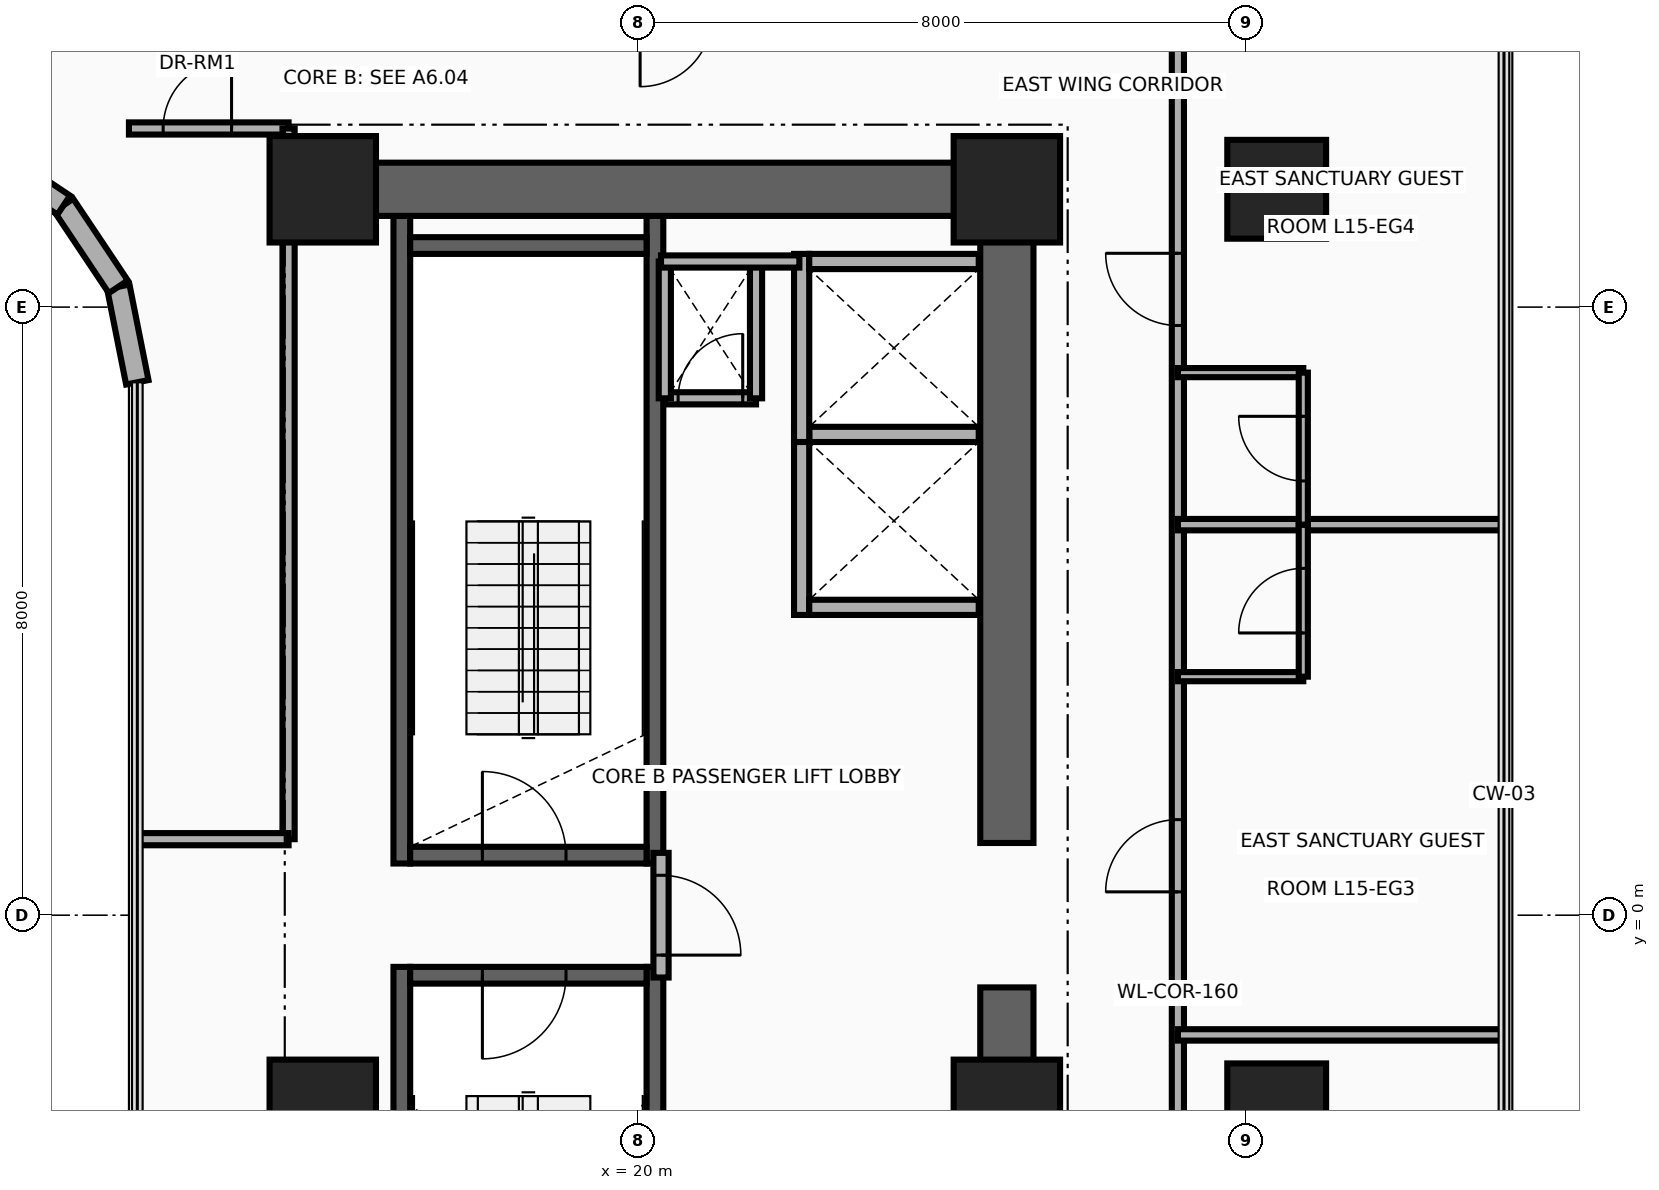
"""IFC4 building model, lengths in metres.
Left out: names, types, materials, properties, quantities, classifications, styles, units other than length and angle.
Written with IfcOpenShell. Run it as: python <this file> out.ifc"""

import sys

from ifc_helpers import new_model, si_unit, direction, frame, frame_2d, origin, origin_2d, place, context, subcontext, project, spatial, rectangle, circle, extrude, source, transform, mapped, element, fill, save


model = new_model("IFC4")
c1 = context("Model", 3, precision=1e-05, world=origin(), true_north=direction((0.0, 1.0)))
c2 = subcontext(c1, "Body", "Model", "MODEL_VIEW")
j1 = project(units=[si_unit("LENGTHUNIT", "METRE"), si_unit("PLANEANGLEUNIT", "RADIAN")], contexts=[c1])
p1 = place(None, origin())
s1 = spatial("IfcSite", under=j1, at=p1, CompositionType="ELEMENT")
p2 = place(p1, origin())
s2 = spatial("IfcBuilding", under=s1, at=p2, CompositionType="ELEMENT")
p3 = place(p2, frame((0.0, 0.0, 63.0)))
s3 = spatial("IfcBuildingStorey", under=s2, at=p3, CompositionType="ELEMENT", Elevation=63.0)
for number, where, z_axis, x_axis in (
    (1, (16.89, 0.68, 0.0), (0.0, 0.0, 1.0), (0.0, 1.0, 0.0)),
    (2, (20.22, 0.68, 0.0), (0.0, 0.0, 1.0), (0.0, 1.0, 0.0)),
):
    element("IfcWall", number, at=place(p3, frame(where, z_axis=z_axis, x_axis=x_axis)), inside=s3, PredefinedType="SHEAR", context=c2, shape_type="SweptSolid", body=[
        extrude(rectangle(XDim=8.52, YDim=0.22, at=frame_2d((4.26, 0.0))), origin(), (0.0, 0.0, 1.0), 3.46),
    ])
p4 = place(p3, frame((17.0, 0.79, 0.0), z_axis=(0.0, 0.0, 1.0), x_axis=(1.0, 0.0, 0.0)))
e3 = element("IfcWall", 3, at=p4, inside=s3, PredefinedType="SHEAR", context=c2, shape_type="SweptSolid", body=[
    extrude(rectangle(XDim=3.11, YDim=0.22, at=frame_2d((1.555, 0.0))), origin(), (0.0, 0.0, 1.0), 3.46),
])
p5 = place(p4, frame((0.95, 0.0, 0.0)))
e4 = element("IfcOpeningElement", 4, at=p5, cuts=e3, PredefinedType="OPENING", context=c2, shape_type="SweptSolid", body=[
    extrude(rectangle(XDim=1.1, YDim=2.15, at=frame_2d((0.55, 1.075))), frame((0.0, 0.125, 0.0), z_axis=(0.0, -1.0, 0.0), x_axis=(1.0, 0.0, 0.0)), (0.0, 0.0, 1.0), 0.25),
])
p6 = place(p3, frame((17.0, 8.81, 0.0), z_axis=(0.0, 0.0, 1.0), x_axis=(1.0, 0.0, 0.0)))
e5 = element("IfcWall", 5, at=p6, inside=s3, PredefinedType="SHEAR", context=c2, shape_type="SweptSolid", body=[
    extrude(rectangle(XDim=3.11, YDim=0.22, at=frame_2d((1.555, 0.0))), origin(), (0.0, 0.0, 1.0), 3.46),
])
for number, where, z_axis, x_axis in (
    (6, (16.89, -9.2, 0.0), (0.0, 0.0, 1.0), (0.0, 1.0, 0.0)),
    (7, (20.22, -9.2, 0.0), (0.0, 0.0, 1.0), (0.0, 1.0, 0.0)),
):
    element("IfcWall", number, at=place(p3, frame(where, z_axis=z_axis, x_axis=x_axis)), inside=s3, PredefinedType="SHEAR", context=c2, shape_type="SweptSolid", body=[
        extrude(rectangle(XDim=8.52, YDim=0.22, at=frame_2d((4.26, 0.0))), origin(), (0.0, 0.0, 1.0), 3.46),
    ])
p7 = place(p3, frame((17.0, -0.79, 0.0), z_axis=(0.0, 0.0, 1.0), x_axis=(1.0, 0.0, 0.0)))
e8 = element("IfcWall", 8, at=p7, inside=s3, PredefinedType="SHEAR", context=c2, shape_type="SweptSolid", body=[
    extrude(rectangle(XDim=3.11, YDim=0.22, at=frame_2d((1.555, 0.0))), origin(), (0.0, 0.0, 1.0), 3.46),
])
p8 = place(p7, frame((0.95, 0.0, 0.0)))
e9 = element("IfcOpeningElement", 9, at=p8, cuts=e8, PredefinedType="OPENING", context=c2, shape_type="SweptSolid", body=[
    extrude(rectangle(XDim=1.1, YDim=2.15, at=frame_2d((0.55, 1.075))), frame((0.0, 0.125, 0.0), z_axis=(0.0, -1.0, 0.0), x_axis=(1.0, 0.0, 0.0)), (0.0, 0.0, 1.0), 0.25),
])
for number, where, z_axis, x_axis in (
    (10, (24.85, -9.9, 0.0), (0.0, 0.0, 1.0), (0.0, 1.0, 0.0)),
    (11, (24.85, 0.95, 0.0), (0.0, 0.0, 1.0), (0.0, 1.0, 0.0)),
):
    element("IfcWall", number, at=place(p3, frame(where, z_axis=z_axis, x_axis=x_axis)), inside=s3, PredefinedType="SHEAR", context=c2, shape_type="SweptSolid", body=[
        extrude(rectangle(XDim=8.95, YDim=0.7, at=frame_2d((4.475, 0.0))), origin(), (0.0, 0.0, 1.0), 3.46),
    ])
p9 = place(p3, frame((15.85, 9.55, 0.0), z_axis=(0.0, 0.0, 1.0), x_axis=(1.0, 0.0, 0.0)))
e12 = element("IfcWall", 12, at=p9, inside=s3, PredefinedType="SHEAR", context=c2, shape_type="SweptSolid", body=[
    extrude(rectangle(XDim=9.0, YDim=0.7, at=frame_2d((4.5, 0.0))), origin(), (0.0, 0.0, 1.0), 3.46),
])
m1 = source(origin(), c2, "Body", "SweptSolid", [
    extrude(rectangle(XDim=1.4, YDim=1.4, at=origin_2d()), origin(), (0.0, 0.0, 1.0), 3.7),
])
for number, where, z_axis, x_axis in (
    (13, (15.85, -2.6, 0.0), (0.0, 0.0, 1.0), (1.0, 0.0, 0.0)),
    (14, (24.85, -2.6, 0.0), (0.0, 0.0, 1.0), (1.0, 0.0, 0.0)),
):
    element("IfcColumn", number, at=place(p3, frame(where, z_axis=z_axis, x_axis=x_axis)), inside=s3, PredefinedType="COLUMN", context=c2, shape_type="MappedRepresentation", body=[
        mapped(m1, transform((0.0, 0.0, 0.0), x_axis=(1.0, 0.0, 0.0), y_axis=(0.0, 1.0, 0.0), z_axis=(0.0, 0.0, 1.0), scale=1.0)),
    ])
m2 = source(origin(), c2, "Body", "SweptSolid", [
    extrude(circle(Radius=0.65, at=origin_2d()), origin(), (0.0, 0.0, 1.0), 3.7),
])
p10 = place(p3, frame((28.4, -2.6, 0.0), z_axis=(0.0, 0.0, 1.0), x_axis=(1.0, 0.0, 0.0)))
e15 = element("IfcColumn", 15, at=p10, inside=s3, PredefinedType="COLUMN", context=c2, shape_type="MappedRepresentation", body=[
    mapped(m2, transform((0.0, 0.0, 0.0), x_axis=(1.0, 0.0, 0.0), y_axis=(0.0, 1.0, 0.0), z_axis=(0.0, 0.0, 1.0), scale=1.0)),
])
for number, where, z_axis, x_axis in (
    (16, (15.85, 9.55, 0.0), (0.0, 0.0, 1.0), (1.0, 0.0, 0.0)),
    (17, (24.85, 9.55, 0.0), (0.0, 0.0, 1.0), (1.0, 0.0, 0.0)),
):
    element("IfcColumn", number, at=place(p3, frame(where, z_axis=z_axis, x_axis=x_axis)), inside=s3, PredefinedType="COLUMN", context=c2, shape_type="MappedRepresentation", body=[
        mapped(m1, transform((0.0, 0.0, 0.0), x_axis=(1.0, 0.0, 0.0), y_axis=(0.0, 1.0, 0.0), z_axis=(0.0, 0.0, 1.0), scale=1.0)),
    ])
p11 = place(p3, frame((28.4, 9.55, 0.0), z_axis=(0.0, 0.0, 1.0), x_axis=(1.0, 0.0, 0.0)))
e18 = element("IfcColumn", 18, at=p11, inside=s3, PredefinedType="COLUMN", context=c2, shape_type="MappedRepresentation", body=[
    mapped(m2, transform((0.0, 0.0, 0.0), x_axis=(1.0, 0.0, 0.0), y_axis=(0.0, 1.0, 0.0), z_axis=(0.0, 0.0, 1.0), scale=1.0)),
])
p12 = place(p3, frame((13.41, 7.011, 0.0), z_axis=(0.0, 0.0, 1.0), x_axis=(-0.195090163074, 0.980785312019, 0.0)))
e19 = element("IfcWall", 19, at=p12, inside=s3, PredefinedType="SOLIDWALL", context=c2, shape_type="SweptSolid", body=[
    extrude(rectangle(XDim=1.281, YDim=0.3, at=frame_2d((0.641, 0.0))), origin(), (0.0, 0.0, 1.0), 3.46),
])
for number, where, z_axis, x_axis in (
    (20, (13.16, 8.268, 0.0), (0.0, 0.0, 1.0), (-0.556, 0.831, 0.0)),
    (21, (12.442, 9.342, 0.0), (0.0, 0.0, 1.0), (-0.831, 0.556, 0.0)),
):
    element("IfcWall", number, at=place(p3, frame(where, z_axis=z_axis, x_axis=x_axis)), inside=s3, PredefinedType="SOLIDWALL", context=c2, shape_type="SweptSolid", body=[
        extrude(rectangle(XDim=1.292, YDim=0.3, at=frame_2d((0.646, 0.0))), origin(), (0.0, 0.0, 1.0), 3.46),
    ])
p13 = place(p3, frame((22.15, 3.95, 0.0), z_axis=(0.0, 0.0, 1.0), x_axis=(0.0, 1.0, 0.0)))
e22 = element("IfcWall", 22, at=p13, inside=s3, PredefinedType="MOVABLE", context=c2, shape_type="SweptSolid", body=[
    extrude(rectangle(XDim=2.475, YDim=0.2, at=frame_2d((1.238, 0.0))), origin(), (0.0, 0.0, 1.0), 3.46),
])
for number, where, z_axis, x_axis in (
    (23, (22.25, 4.05, 0.0), (0.0, 0.0, 1.0), (1.0, 0.0, 0.0)),
    (24, (22.25, 6.325, 0.0), (0.0, 0.0, 1.0), (1.0, 0.0, 0.0)),
):
    element("IfcWall", number, at=place(p3, frame(where, z_axis=z_axis, x_axis=x_axis)), inside=s3, PredefinedType="MOVABLE", context=c2, shape_type="SweptSolid", body=[
        extrude(rectangle(XDim=2.23, YDim=0.2, at=frame_2d((1.115, 0.0))), origin(), (0.0, 0.0, 1.0), 2.245),
    ])
p14 = place(p3, frame((22.15, 6.225, 0.0), z_axis=(0.0, 0.0, 1.0), x_axis=(0.0, 1.0, 0.0)))
e25 = element("IfcWall", 25, at=p14, inside=s3, PredefinedType="MOVABLE", context=c2, shape_type="SweptSolid", body=[
    extrude(rectangle(XDim=2.475, YDim=0.2, at=frame_2d((1.237, 0.0))), origin(), (0.0, 0.0, 1.0), 3.46),
])
p15 = place(p3, frame((22.25, 8.6, 0.0), z_axis=(0.0, 0.0, 1.0), x_axis=(1.0, 0.0, 0.0)))
e26 = element("IfcWall", 26, at=p15, inside=s3, PredefinedType="MOVABLE", context=c2, shape_type="SweptSolid", body=[
    extrude(rectangle(XDim=2.23, YDim=0.2, at=frame_2d((1.115, 0.0))), origin(), (0.0, 0.0, 1.0), 2.245),
])
p16 = place(p3, frame((20.3, -0.82, 0.0), z_axis=(0.0, 0.0, 1.0), x_axis=(0.0, 1.0, 0.0)))
e27 = element("IfcWall", 27, at=p16, inside=s3, PredefinedType="PARTITIONING", context=c2, shape_type="SweptSolid", body=[
    extrude(rectangle(XDim=1.64, YDim=0.2, at=frame_2d((0.82, 0.0))), origin(), (0.0, 0.0, 1.0), 3.46),
])
p17 = place(p16, frame((0.295, 0.0, 0.0)))
e28 = element("IfcOpeningElement", 28, at=p17, cuts=e27, PredefinedType="OPENING", context=c2, shape_type="SweptSolid", body=[
    extrude(rectangle(XDim=1.05, YDim=2.15, at=frame_2d((0.525, 1.075))), frame((0.0, 0.115, 0.0), z_axis=(0.0, -1.0, 0.0), x_axis=(1.0, 0.0, 0.0)), (0.0, 0.0, 1.0), 0.23),
])
p18 = place(p3, frame((20.35, 6.8, 0.0), z_axis=(0.0, 0.0, 1.0), x_axis=(1.0, 0.0, 0.0)))
e29 = element("IfcWall", 29, at=p18, inside=s3, PredefinedType="PARTITIONING", context=c2, shape_type="SweptSolid", body=[
    extrude(rectangle(XDim=1.2, YDim=0.16, at=frame_2d((0.6, 0.0))), origin(), (0.0, 0.0, 1.0), 3.46),
])
p19 = place(p18, frame((0.175, 0.0, 0.0)))
e30 = element("IfcOpeningElement", 30, at=p19, cuts=e29, PredefinedType="OPENING", context=c2, shape_type="SweptSolid", body=[
    extrude(rectangle(XDim=0.85, YDim=2.05, at=frame_2d((0.425, 1.025))), frame((0.0, 0.095, 0.0), z_axis=(0.0, -1.0, 0.0), x_axis=(1.0, 0.0, 0.0)), (0.0, 0.0, 1.0), 0.19),
])
for number, where, z_axis, x_axis in (
    (31, (21.55, 6.8, 0.0), (0.0, 0.0, 1.0), (0.0, 1.0, 0.0)),
    (32, (20.35, 6.8, 0.0), (0.0, 0.0, 1.0), (0.0, 1.0, 0.0)),
):
    element("IfcWall", number, at=place(p3, frame(where, z_axis=z_axis, x_axis=x_axis)), inside=s3, PredefinedType="PARTITIONING", context=c2, shape_type="SweptSolid", body=[
        extrude(rectangle(XDim=1.8, YDim=0.16, at=frame_2d((0.9, 0.0))), origin(), (0.0, 0.0, 1.0), 3.46),
    ])
p20 = place(p3, frame((20.3, 8.6, 0.0), z_axis=(0.0, 0.0, 1.0), x_axis=(1.0, 0.0, 0.0)))
e33 = element("IfcWall", 33, at=p20, inside=s3, PredefinedType="PARTITIONING", context=c2, shape_type="SweptSolid", body=[
    extrude(rectangle(XDim=1.82, YDim=0.16, at=frame_2d((0.91, 0.0))), origin(), (0.0, 0.0, 1.0), 3.46),
])
p21 = place(p3, frame((27.1, -13.89, 0.0), z_axis=(0.0, 0.0, 1.0), x_axis=(0.0, 1.0, 0.0)))
e34 = element("IfcWall", 34, at=p21, inside=s3, PredefinedType="PARTITIONING", context=c2, shape_type="SweptSolid", body=[
    extrude(rectangle(XDim=25.74, YDim=0.16, at=frame_2d((12.87, 0.0))), origin(), (0.0, 0.0, 1.0), 2.583),
])
p22 = place(p21, frame((2.62, 0.0, 0.0)))
e35 = element("IfcOpeningElement", 35, at=p22, cuts=e34, PredefinedType="OPENING", context=c2, shape_type="SweptSolid", body=[
    extrude(rectangle(XDim=0.95, YDim=2.15, at=frame_2d((0.475, 1.075))), frame((0.0, 0.095, 0.0), z_axis=(0.0, -1.0, 0.0), x_axis=(1.0, 0.0, 0.0)), (0.0, 0.0, 1.0), 0.19),
])
p23 = place(p21, frame((8.484, 0.0, 0.0)))
e36 = element("IfcOpeningElement", 36, at=p23, cuts=e34, PredefinedType="OPENING", context=c2, shape_type="SweptSolid", body=[
    extrude(rectangle(XDim=0.95, YDim=2.15, at=frame_2d((0.475, 1.075))), frame((0.0, 0.095, 0.0), z_axis=(0.0, -1.0, 0.0), x_axis=(1.0, 0.0, 0.0)), (0.0, 0.0, 1.0), 0.19),
])
p24 = place(p21, frame((14.197, 0.0, 0.0)))
e37 = element("IfcOpeningElement", 37, at=p24, cuts=e34, PredefinedType="OPENING", context=c2, shape_type="SweptSolid", body=[
    extrude(rectangle(XDim=0.95, YDim=2.15, at=frame_2d((0.475, 1.075))), frame((0.0, 0.095, 0.0), z_axis=(0.0, -1.0, 0.0), x_axis=(1.0, 0.0, 0.0)), (0.0, 0.0, 1.0), 0.19),
])
p25 = place(p21, frame((21.648, 0.0, 0.0)))
e38 = element("IfcOpeningElement", 38, at=p25, cuts=e34, PredefinedType="OPENING", context=c2, shape_type="SweptSolid", body=[
    extrude(rectangle(XDim=0.95, YDim=2.15, at=frame_2d((0.475, 1.075))), frame((0.0, 0.095, 0.0), z_axis=(0.0, -1.0, 0.0), x_axis=(1.0, 0.0, 0.0)), (0.0, 0.0, 1.0), 0.19),
])
for number, where, z_axis, x_axis in (
    (39, (27.1, -1.575, 0.0), (0.0, 0.0, 1.0), (1.0, 0.0, 0.0)),
    (40, (27.1, 5.138, 0.0), (0.0, 0.0, 1.0), (1.0, 0.0, 0.0)),
):
    element("IfcWall", number, at=place(p3, frame(where, z_axis=z_axis, x_axis=x_axis)), inside=s3, PredefinedType="PARTITIONING", context=c2, shape_type="SweptSolid", body=[
        extrude(rectangle(XDim=4.29, YDim=0.15, at=frame_2d((2.145, 0.0))), origin(), (0.0, 0.0, 1.0), 2.896),
    ])
p26 = place(p3, frame((27.1, 3.138, 0.0), z_axis=(0.0, 0.0, 1.0), x_axis=(1.0, 0.0, 0.0)))
e41 = element("IfcWall", 41, at=p26, inside=s3, PredefinedType="PARTITIONING", context=c2, shape_type="SweptSolid", body=[
    extrude(rectangle(XDim=1.65, YDim=0.12, at=frame_2d((0.825, 0.0))), origin(), (0.0, 0.0, 1.0), 2.896),
])
p27 = place(p3, frame((28.75, 3.138, 0.0), z_axis=(0.0, 0.0, 1.0), x_axis=(0.0, 1.0, 0.0)))
e42 = element("IfcWall", 42, at=p27, inside=s3, PredefinedType="PARTITIONING", context=c2, shape_type="SweptSolid", body=[
    extrude(rectangle(XDim=2.0, YDim=0.12, at=frame_2d((1.0, 0.0))), origin(), (0.0, 0.0, 1.0), 3.46),
])
p28 = place(p27, frame((0.575, 0.0, 0.0)))
e43 = element("IfcOpeningElement", 43, at=p28, cuts=e42, PredefinedType="OPENING", context=c2, shape_type="SweptSolid", body=[
    extrude(rectangle(XDim=0.85, YDim=2.1, at=frame_2d((0.425, 1.05))), frame((0.0, 0.075, 0.0), z_axis=(0.0, -1.0, 0.0), x_axis=(1.0, 0.0, 0.0)), (0.0, 0.0, 1.0), 0.15),
])
p29 = place(p3, frame((27.1, 7.138, 0.0), z_axis=(0.0, 0.0, 1.0), x_axis=(1.0, 0.0, 0.0)))
e44 = element("IfcWall", 44, at=p29, inside=s3, PredefinedType="PARTITIONING", context=c2, shape_type="SweptSolid", body=[
    extrude(rectangle(XDim=1.65, YDim=0.12, at=frame_2d((0.825, 0.0))), origin(), (0.0, 0.0, 1.0), 2.896),
])
p30 = place(p3, frame((28.75, 5.138, 0.0), z_axis=(0.0, 0.0, 1.0), x_axis=(0.0, 1.0, 0.0)))
e45 = element("IfcWall", 45, at=p30, inside=s3, PredefinedType="PARTITIONING", context=c2, shape_type="SweptSolid", body=[
    extrude(rectangle(XDim=2.0, YDim=0.12, at=frame_2d((1.0, 0.0))), origin(), (0.0, 0.0, 1.0), 3.46),
])
p31 = place(p30, frame((0.575, 0.0, 0.0)))
e46 = element("IfcOpeningElement", 46, at=p31, cuts=e45, PredefinedType="OPENING", context=c2, shape_type="SweptSolid", body=[
    extrude(rectangle(XDim=0.85, YDim=2.1, at=frame_2d((0.425, 1.05))), frame((0.0, 0.075, 0.0), z_axis=(0.0, -1.0, 0.0), x_axis=(1.0, 0.0, 0.0)), (0.0, 0.0, 1.0), 0.15),
])
p32 = place(p3, frame((13.3, 10.35, 0.0), z_axis=(0.0, 0.0, 1.0), x_axis=(1.0, 0.0, 0.0)))
e47 = element("IfcWall", 47, at=p32, inside=s3, PredefinedType="PARTITIONING", context=c2, shape_type="SweptSolid", body=[
    extrude(rectangle(XDim=2.1, YDim=0.16, at=frame_2d((1.05, 0.0))), origin(), (0.0, 0.0, 1.0), 2.583),
])
p33 = place(p32, frame((0.45, 0.0, 0.0)))
e48 = element("IfcOpeningElement", 48, at=p33, cuts=e47, PredefinedType="OPENING", context=c2, shape_type="SweptSolid", body=[
    extrude(rectangle(XDim=0.9, YDim=2.1, at=frame_2d((0.45, 1.05))), frame((0.0, 0.095, 0.0), z_axis=(0.0, -1.0, 0.0), x_axis=(1.0, 0.0, 0.0)), (0.0, 0.0, 1.0), 0.19),
])
p34 = place(p3, frame((15.4, 1.0, 0.0), z_axis=(0.0, 0.0, 1.0), x_axis=(0.0, 1.0, 0.0)))
e49 = element("IfcWall", 49, at=p34, inside=s3, PredefinedType="PARTITIONING", context=c2, shape_type="SweptSolid", body=[
    extrude(rectangle(XDim=9.35, YDim=0.16, at=frame_2d((4.675, 0.0))), origin(), (0.0, 0.0, 1.0), 2.245),
])
p35 = place(p3, frame((13.41, 1.0, 0.0), z_axis=(0.0, 0.0, 1.0), x_axis=(1.0, 0.0, 0.0)))
e50 = element("IfcWall", 50, at=p35, inside=s3, PredefinedType="PARTITIONING", context=c2, shape_type="SweptSolid", body=[
    extrude(rectangle(XDim=1.99, YDim=0.16, at=frame_2d((0.995, 0.0))), origin(), (0.0, 0.0, 1.0), 2.245),
])
p36 = place(p17, frame((1.05, 0.0, 0.0), z_axis=(0.0, 0.0, 1.0), x_axis=(-1.0, 0.0, 0.0)))
e51 = element("IfcDoor", 51, at=p36, inside=s3, OperationType="SINGLE_SWING_LEFT", PredefinedType="DOOR", context=c2, shape_type="SweptSolid", body=[
    extrude(rectangle(XDim=1.05, YDim=2.15, at=frame_2d((0.525, 1.075))), frame((0.0, 0.025, 0.0), z_axis=(0.0, -1.0, 0.0), x_axis=(1.0, 0.0, 0.0)), (0.0, 0.0, 1.0), 0.05),
])
fill(e28, e51)
p37 = place(p5, origin())
e52 = element("IfcDoor", 52, at=p37, inside=s3, OperationType="SINGLE_SWING_RIGHT", PredefinedType="DOOR", context=c2, shape_type="SweptSolid", body=[
    extrude(rectangle(XDim=1.1, YDim=2.15, at=frame_2d((0.55, 1.075))), frame((0.0, 0.025, 0.0), z_axis=(0.0, -1.0, 0.0), x_axis=(1.0, 0.0, 0.0)), (0.0, 0.0, 1.0), 0.05),
])
fill(e4, e52)
p38 = place(p8, frame((1.1, 0.0, 0.0), z_axis=(0.0, 0.0, 1.0), x_axis=(-1.0, 0.0, 0.0)))
e53 = element("IfcDoor", 53, at=p38, inside=s3, OperationType="SINGLE_SWING_LEFT", PredefinedType="DOOR", context=c2, shape_type="SweptSolid", body=[
    extrude(rectangle(XDim=1.1, YDim=2.15, at=frame_2d((0.55, 1.075))), frame((0.0, 0.025, 0.0), z_axis=(0.0, -1.0, 0.0), x_axis=(1.0, 0.0, 0.0)), (0.0, 0.0, 1.0), 0.05),
])
fill(e9, e53)
p39 = place(p19, origin())
e54 = element("IfcDoor", 54, at=p39, inside=s3, OperationType="SINGLE_SWING_RIGHT", PredefinedType="DOOR", context=c2, shape_type="SweptSolid", body=[
    extrude(rectangle(XDim=0.85, YDim=2.05, at=frame_2d((0.425, 1.025))), frame((0.0, 0.025, 0.0), z_axis=(0.0, -1.0, 0.0), x_axis=(1.0, 0.0, 0.0)), (0.0, 0.0, 1.0), 0.05),
])
fill(e30, e54)
p40 = place(p24, origin())
e55 = element("IfcDoor", 55, at=p40, inside=s3, OperationType="SINGLE_SWING_RIGHT", PredefinedType="DOOR", context=c2, shape_type="SweptSolid", body=[
    extrude(rectangle(XDim=0.95, YDim=2.15, at=frame_2d((0.475, 1.075))), frame((0.0, 0.025, 0.0), z_axis=(0.0, -1.0, 0.0), x_axis=(1.0, 0.0, 0.0)), (0.0, 0.0, 1.0), 0.05),
])
fill(e37, e55)
p41 = place(p28, origin())
e56 = element("IfcDoor", 56, at=p41, inside=s3, OperationType="SINGLE_SWING_LEFT", PredefinedType="DOOR", context=c2, shape_type="SweptSolid", body=[
    extrude(rectangle(XDim=0.85, YDim=2.1, at=frame_2d((0.425, 1.05))), frame((0.0, 0.025, 0.0), z_axis=(0.0, -1.0, 0.0), x_axis=(1.0, 0.0, 0.0)), (0.0, 0.0, 1.0), 0.05),
])
fill(e43, e56)
p42 = place(p25, origin())
e57 = element("IfcDoor", 57, at=p42, inside=s3, OperationType="SINGLE_SWING_RIGHT", PredefinedType="DOOR", context=c2, shape_type="SweptSolid", body=[
    extrude(rectangle(XDim=0.95, YDim=2.15, at=frame_2d((0.475, 1.075))), frame((0.0, 0.025, 0.0), z_axis=(0.0, -1.0, 0.0), x_axis=(1.0, 0.0, 0.0)), (0.0, 0.0, 1.0), 0.05),
])
fill(e38, e57)
p43 = place(p31, origin())
e58 = element("IfcDoor", 58, at=p43, inside=s3, OperationType="SINGLE_SWING_LEFT", PredefinedType="DOOR", context=c2, shape_type="SweptSolid", body=[
    extrude(rectangle(XDim=0.85, YDim=2.1, at=frame_2d((0.425, 1.05))), frame((0.0, 0.025, 0.0), z_axis=(0.0, -1.0, 0.0), x_axis=(1.0, 0.0, 0.0)), (0.0, 0.0, 1.0), 0.05),
])
fill(e46, e58)
p44 = place(p33, origin())
e59 = element("IfcDoor", 59, at=p44, inside=s3, OperationType="SINGLE_SWING_RIGHT", PredefinedType="DOOR", context=c2, shape_type="SweptSolid", body=[
    extrude(rectangle(XDim=0.9, YDim=2.1, at=frame_2d((0.45, 1.05))), frame((0.0, 0.025, 0.0), z_axis=(0.0, -1.0, 0.0), x_axis=(1.0, 0.0, 0.0)), (0.0, 0.0, 1.0), 0.05),
])
fill(e48, e59)
save(model, sys.argv[1])
